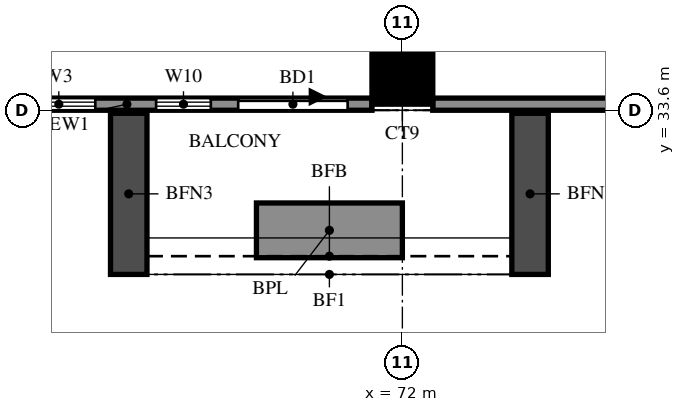
"""IFC4 building model, lengths in metres.
Left out: names, types, materials, properties, quantities, classifications, styles, units other than length and angle.
Written with IfcOpenShell. Run it as: python <this file> out.ifc"""

import sys

from ifc_helpers import new_model, si_unit, direction, frame, frame_2d, origin, origin_2d, place, context, subcontext, project, spatial, rectangle, extrude, source, transform, mapped, element, fill, save


model = new_model("IFC4")
c1 = context("Model", 3, precision=1e-05, world=origin(), true_north=direction((0.0, 1.0)))
c2 = subcontext(c1, "Body", "Model", "MODEL_VIEW")
j1 = project(units=[si_unit("LENGTHUNIT", "METRE"), si_unit("PLANEANGLEUNIT", "RADIAN")], contexts=[c1])
p1 = place(None, origin())
s1 = spatial("IfcSite", under=j1, at=p1, CompositionType="ELEMENT")
p2 = place(p1, origin())
s2 = spatial("IfcBuilding", under=s1, at=p2, CompositionType="ELEMENT")
p3 = place(p2, frame((0.0, 0.0, 90.0)))
s3 = spatial("IfcBuildingStorey", under=s2, at=p3, CompositionType="ELEMENT", Elevation=90.0)
m1 = source(origin(), c2, "Body", "SweptSolid", [
    extrude(rectangle(XDim=1.0, YDim=1.0, at=origin_2d()), origin(), (0.0, 0.0, 1.0), 3.18),
])
p4 = place(p3, frame((72.0, 34.2, 0.0), z_axis=(0.0, 0.0, 1.0), x_axis=(1.0, 0.0, 0.0)))
e1 = element("IfcColumn", 1, at=p4, inside=s3, PredefinedType="COLUMN", context=c2, shape_type="MappedRepresentation", body=[
    mapped(m1, transform((0.0, 0.0, 0.0))),
])
p5 = place(p3, frame((85.996, 33.863, 0.0), z_axis=(0.0, 0.0, 1.0), x_axis=(-0.707100718496, 0.707112843825, 0.0)))
e2 = element("IfcWall", 2, at=p5, inside=s3, PredefinedType="SOLIDWALL", context=c2, shape_type="SweptSolid", body=[
    extrude(rectangle(XDim=20.135, YDim=0.2, at=frame_2d((10.067, 0.0))), origin(), (0.0, 0.0, 1.0), 3.18),
])
p6 = place(p3, frame((65.3, 33.7, 0.0), z_axis=(0.0, 0.0, 1.0), x_axis=(1.0, 0.0, 0.0)))
e3 = element("IfcWall", 3, at=p6, inside=s3, PredefinedType="SOLIDWALL", context=c2, shape_type="SweptSolid", body=[
    extrude(rectangle(XDim=6.2, YDim=0.2, at=frame_2d((3.1, 0.0))), origin(), (0.0, 0.0, 1.0), 3.18),
])
p7 = place(p6, frame((4.0, 0.0, 0.0)))
e4 = element("IfcOpeningElement", 4, at=p7, cuts=e3, PredefinedType="OPENING", context=c2, shape_type="SweptSolid", body=[
    extrude(rectangle(XDim=1.8, YDim=2.4, at=frame_2d((0.9, 1.2))), frame((0.0, 0.11, 0.0), z_axis=(0.0, -1.0, 0.0), x_axis=(1.0, 0.0, 0.0)), (0.0, 0.0, 1.0), 0.22),
])
p8 = place(p6, frame((0.45, 0.0, 0.6)))
e5 = element("IfcOpeningElement", 5, at=p8, cuts=e3, PredefinedType="OPENING", context=c2, shape_type="SweptSolid", body=[
    extrude(rectangle(XDim=1.2, YDim=2.4, at=frame_2d((0.6, 1.2))), frame((0.0, 0.11, 0.0), z_axis=(0.0, -1.0, 0.0), x_axis=(1.0, 0.0, 0.0)), (0.0, 0.0, 1.0), 0.22),
])
p9 = place(p6, frame((2.65, 0.0, 0.6)))
e6 = element("IfcOpeningElement", 6, at=p9, cuts=e3, PredefinedType="OPENING", context=c2, shape_type="SweptSolid", body=[
    extrude(rectangle(XDim=0.9, YDim=2.4, at=frame_2d((0.45, 1.2))), frame((0.0, 0.11, 0.0), z_axis=(0.0, -1.0, 0.0), x_axis=(1.0, 0.0, 0.0)), (0.0, 0.0, 1.0), 0.22),
])
p10 = place(p3, frame((72.5, 33.7, 0.0), z_axis=(0.0, 0.0, 1.0), x_axis=(1.0, 0.0, 0.0)))
e7 = element("IfcWall", 7, at=p10, inside=s3, PredefinedType="SOLIDWALL", context=c2, shape_type="SweptSolid", body=[
    extrude(rectangle(XDim=13.659, YDim=0.2, at=frame_2d((6.829, 0.0))), origin(), (0.0, 0.0, 1.0), 3.18),
])
p11 = place(p10, frame((3.1, 0.0, 0.6)))
e8 = element("IfcOpeningElement", 8, at=p11, cuts=e7, PredefinedType="OPENING", context=c2, shape_type="SweptSolid", body=[
    extrude(rectangle(XDim=2.4, YDim=2.4, at=frame_2d((1.2, 1.2))), frame((0.0, 0.11, 0.0), z_axis=(0.0, -1.0, 0.0), x_axis=(1.0, 0.0, 0.0)), (0.0, 0.0, 1.0), 0.22),
])
p12 = place(p10, frame((7.386, 0.0, 0.6)))
e9 = element("IfcOpeningElement", 9, at=p12, cuts=e7, PredefinedType="OPENING", context=c2, shape_type="SweptSolid", body=[
    extrude(rectangle(XDim=2.4, YDim=2.4, at=frame_2d((1.2, 1.2))), frame((0.0, 0.11, 0.0), z_axis=(0.0, -1.0, 0.0), x_axis=(1.0, 0.0, 0.0)), (0.0, 0.0, 1.0), 0.22),
])
p13 = place(p10, frame((10.372, 0.0, 0.6)))
e10 = element("IfcOpeningElement", 10, at=p13, cuts=e7, PredefinedType="OPENING", context=c2, shape_type="SweptSolid", body=[
    extrude(rectangle(XDim=2.4, YDim=2.4, at=frame_2d((1.2, 1.2))), frame((0.0, 0.11, 0.0), z_axis=(0.0, -1.0, 0.0), x_axis=(1.0, 0.0, 0.0)), (0.0, 0.0, 1.0), 0.22),
])
for number, where, z_axis, x_axis in (
    (11, (67.5, 33.55, 0.0), (0.0, 0.0, 1.0), (0.0, -1.0, 0.0)),
    (12, (74.1, 33.55, 0.0), (0.0, 0.0, 1.0), (0.0, -1.0, 0.0)),
):
    element("IfcWall", number, at=place(p3, frame(where, z_axis=z_axis, x_axis=x_axis)), inside=s3, PredefinedType="SOLIDWALL", context=c2, shape_type="SweptSolid", body=[
        extrude(rectangle(XDim=2.65, YDim=0.6, at=frame_2d((1.325, 0.0))), origin(), (0.0, 0.0, 1.0), 2.85),
    ])
p14 = place(p3, frame((69.6, 31.625, 0.0), z_axis=(0.0, 0.0, 1.0), x_axis=(1.0, 0.0, 0.0)))
e13 = element("IfcWall", 13, at=p14, inside=s3, PredefinedType="SOLIDWALL", context=c2, shape_type="SweptSolid", body=[
    extrude(rectangle(XDim=2.4, YDim=0.9, at=frame_2d((1.2, 0.0))), origin(), (0.0, 0.0, 1.0), 0.9),
])
p15 = place(p3, frame((72.0, 33.725, 0.0), z_axis=(0.0, 0.0, 1.0), x_axis=(0.0, 1.0, 0.0)))
e14 = element("IfcWall", 14, at=p15, inside=s3, PredefinedType="PARTITIONING", context=c2, shape_type="SweptSolid", body=[
    extrude(rectangle(XDim=14.098, YDim=0.12, at=frame_2d((7.049, 0.0))), origin(), (0.0, 0.0, 1.0), 2.28),
])
p16 = place(p15, frame((10.075, 0.0, 0.0)))
e15 = element("IfcOpeningElement", 15, at=p16, cuts=e14, PredefinedType="OPENING", context=c2, shape_type="SweptSolid", body=[
    extrude(rectangle(XDim=0.9, YDim=2.1, at=frame_2d((0.45, 1.05))), frame((0.0, 0.07, 0.0), z_axis=(0.0, -1.0, 0.0), x_axis=(1.0, 0.0, 0.0)), (0.0, 0.0, 1.0), 0.14),
])
p17 = place(p7, origin())
e16 = element("IfcDoor", 16, at=p17, inside=s3, OperationType="DOUBLE_DOOR_SLIDING", PredefinedType="DOOR", context=c2, shape_type="SweptSolid", body=[
    extrude(rectangle(XDim=1.8, YDim=2.4, at=frame_2d((0.9, 1.2))), frame((0.0, 0.025, 0.0), z_axis=(0.0, -1.0, 0.0), x_axis=(1.0, 0.0, 0.0)), (0.0, 0.0, 1.0), 0.05),
])
fill(e4, e16)
p18 = place(p8, origin())
e17 = element("IfcWindow", 17, at=p18, inside=s3, PartitioningType="SINGLE_PANEL", PredefinedType="WINDOW", context=c2, shape_type="SweptSolid", body=[
    extrude(rectangle(XDim=1.2, YDim=2.4, at=frame_2d((0.6, 1.2))), frame((0.0, 0.03, 0.0), z_axis=(0.0, -1.0, 0.0), x_axis=(1.0, 0.0, 0.0)), (0.0, 0.0, 1.0), 0.06),
])
fill(e5, e17)
p19 = place(p9, origin())
e18 = element("IfcWindow", 18, at=p19, inside=s3, PartitioningType="SINGLE_PANEL", PredefinedType="WINDOW", context=c2, shape_type="SweptSolid", body=[
    extrude(rectangle(XDim=0.9, YDim=2.4, at=frame_2d((0.45, 1.2))), frame((0.0, 0.03, 0.0), z_axis=(0.0, -1.0, 0.0), x_axis=(1.0, 0.0, 0.0)), (0.0, 0.0, 1.0), 0.06),
])
fill(e6, e18)
save(model, sys.argv[1])
